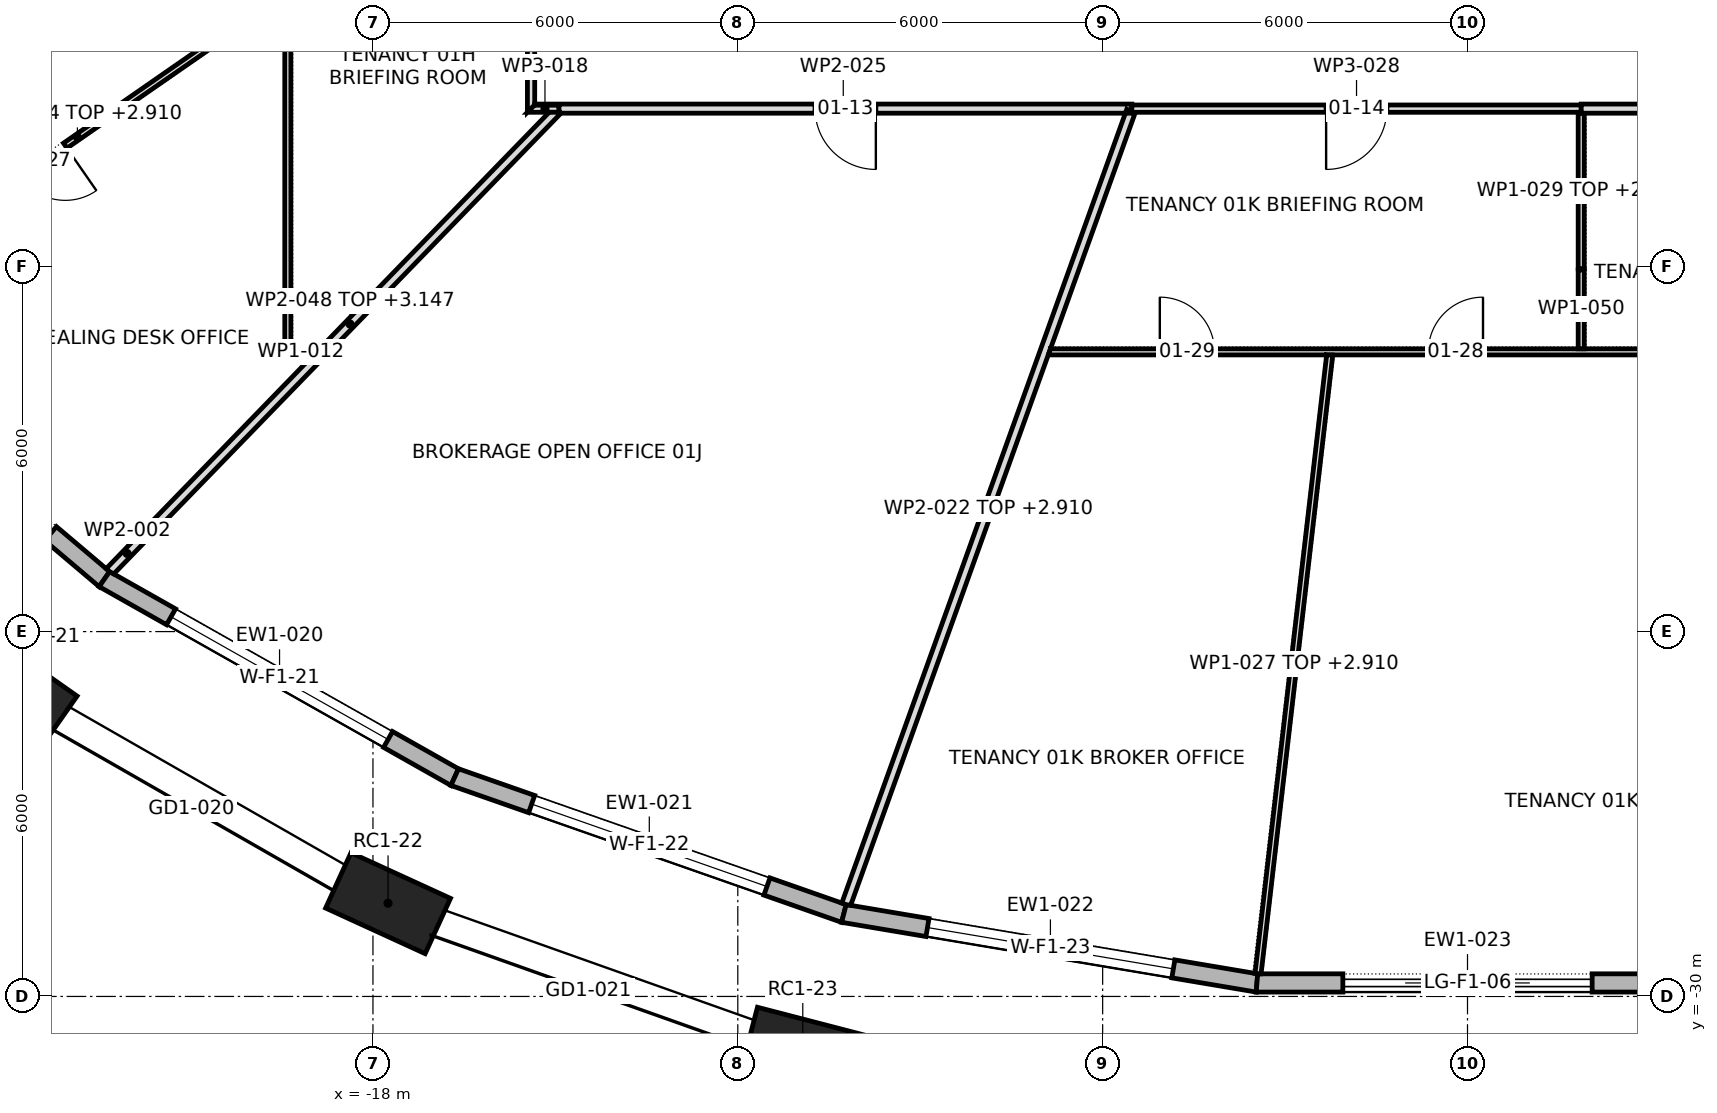
"""IFC4 building model, lengths in metres.
Left out: names, types, materials, properties, quantities, classifications, styles, units other than length and angle.
Written with IfcOpenShell. Run it as: python <this file> out.ifc"""

import sys

from ifc_helpers import new_model, si_unit, direction, frame, frame_2d, origin, origin_2d, place, context, subcontext, project, spatial, polyline, rectangle, outline, extrude, element, fill, save


model = new_model("IFC4")
c1 = context("Model", 3, precision=1e-05, world=origin(), true_north=direction((0.0, 1.0)))
c2 = subcontext(c1, "Body", "Model", "MODEL_VIEW")
j1 = project(units=[si_unit("LENGTHUNIT", "METRE"), si_unit("PLANEANGLEUNIT", "RADIAN")], contexts=[c1])
p1 = place(None, origin())
s1 = spatial("IfcSite", under=j1, at=p1, CompositionType="ELEMENT")
p2 = place(p1, origin())
s2 = spatial("IfcBuilding", under=s1, at=p2, CompositionType="ELEMENT")
p3 = place(p2, frame((0.0, 0.0, 31.9)))
s3 = spatial("IfcBuildingStorey", under=s2, at=p3, CompositionType="ELEMENT", Elevation=31.9)
for number, where, z_axis, x_axis in (
    (1, (-23.89, -24.951, 0.0), (0.0, 0.0, 1.0), (0.818, -0.575, 0.0)),
    (2, (-17.752, -28.467, 0.0), (0.0, 0.0, 1.0), (0.909, -0.417, 0.0)),
    (3, (-10.931, -30.888, 0.0), (0.0, 0.0, 1.0), (0.968, -0.252, 0.0)),
):
    element("IfcColumn", number, at=place(p3, frame(where, z_axis=z_axis, x_axis=x_axis)), inside=s3, PredefinedType="COLUMN", context=c2, shape_type="SweptSolid", body=[
        extrude(rectangle(XDim=1.8, YDim=1.0, at=origin_2d()), origin(), (0.0, 0.0, 1.0), 4.2),
    ])
p4 = place(p3, frame((-27.318, -18.992, 0.0), z_axis=(0.0, 0.0, 1.0), x_axis=(0.763540615407, -0.645759807223, 0.0)))
e4 = element("IfcWall", 4, at=p4, inside=s3, PredefinedType="STANDARD", context=c2, shape_type="SweptSolid", body=[
    extrude(outline(polyline([(-0.015, -0.15), (6.434, -0.15), (6.406, 0.15), (0.015, 0.15), (-0.015, -0.15)])), origin(), (0.0, 0.0, 1.0), 3.9),
])
p5 = place(p4, frame((1.16, 0.0, 0.0)))
e5 = element("IfcOpeningElement", 5, at=p5, cuts=e4, PredefinedType="OPENING", context=c2, shape_type="SweptSolid", body=[
    extrude(rectangle(XDim=4.1, YDim=3.45, at=frame_2d((2.05, 1.725))), frame((0.0, 0.162, 0.0), z_axis=(0.0, -1.0, 0.0), x_axis=(1.0, 0.0, 0.0)), (0.0, 0.0, 1.0), 0.324),
])
p6 = place(p3, frame((-22.417, -23.137, 0.0), z_axis=(0.0, 0.0, 1.0), x_axis=(0.8705786416, -0.492029296678, 0.0)))
e6 = element("IfcWall", 6, at=p6, inside=s3, PredefinedType="STANDARD", context=c2, shape_type="SweptSolid", body=[
    extrude(outline(polyline([(-0.014, -0.15), (6.631, -0.15), (6.604, 0.15), (0.014, 0.15), (-0.014, -0.15)])), origin(), (0.0, 0.0, 1.0), 3.9),
])
p7 = place(p6, frame((1.259, 0.0, 0.6)))
e7 = element("IfcOpeningElement", 7, at=p7, cuts=e6, PredefinedType="OPENING", context=c2, shape_type="SweptSolid", body=[
    extrude(rectangle(XDim=4.1, YDim=2.85, at=frame_2d((2.05, 1.425))), frame((0.0, 0.162, 0.0), z_axis=(0.0, -1.0, 0.0), x_axis=(1.0, 0.0, 0.0)), (0.0, 0.0, 1.0), 0.324),
])
p8 = place(p3, frame((-16.656, -26.393, 0.0), z_axis=(0.0, 0.0, 1.0), x_axis=(0.943767392455, -0.330610206947, 0.0)))
e8 = element("IfcWall", 8, at=p8, inside=s3, PredefinedType="STANDARD", context=c2, shape_type="SweptSolid", body=[
    extrude(outline(polyline([(-0.013, -0.15), (6.794, -0.15), (6.769, 0.15), (0.013, 0.15), (-0.013, -0.15)])), origin(), (0.0, 0.0, 1.0), 3.9),
])
p9 = place(p8, frame((1.341, 0.0, 0.6)))
e9 = element("IfcOpeningElement", 9, at=p9, cuts=e8, PredefinedType="OPENING", context=c2, shape_type="SweptSolid", body=[
    extrude(rectangle(XDim=4.1, YDim=2.85, at=frame_2d((2.05, 1.425))), frame((0.0, 0.162, 0.0), z_axis=(0.0, -1.0, 0.0), x_axis=(1.0, 0.0, 0.0)), (0.0, 0.0, 1.0), 0.324),
])
p10 = place(p3, frame((-10.256, -28.635, 0.0), z_axis=(0.0, 0.0, 1.0), x_axis=(0.986141805867, -0.165904607291, 0.0)))
e10 = element("IfcWall", 10, at=p10, inside=s3, PredefinedType="STANDARD", context=c2, shape_type="SweptSolid", body=[
    extrude(outline(polyline([(-0.013, -0.15), (6.901, -0.15), (6.876, 0.15), (0.013, 0.15), (-0.013, -0.15)])), origin(), (0.0, 0.0, 1.0), 3.9),
])
p11 = place(p10, frame((1.394, 0.0, 0.6)))
e11 = element("IfcOpeningElement", 11, at=p11, cuts=e10, PredefinedType="OPENING", context=c2, shape_type="SweptSolid", body=[
    extrude(rectangle(XDim=4.1, YDim=2.85, at=frame_2d((2.05, 1.425))), frame((0.0, 0.162, 0.0), z_axis=(0.0, -1.0, 0.0), x_axis=(1.0, 0.0, 0.0)), (0.0, 0.0, 1.0), 0.324),
])
p12 = place(p3, frame((-3.463, -29.778, 0.0), z_axis=(0.0, 0.0, 1.0), x_axis=(1.0, 0.0, 0.0)))
e12 = element("IfcWall", 12, at=p12, inside=s3, PredefinedType="STANDARD", context=c2, shape_type="SweptSolid", body=[
    extrude(outline(polyline([(-0.012, -0.15), (6.938, -0.15), (6.913, 0.15), (0.012, 0.15), (-0.012, -0.15)])), origin(), (0.0, 0.0, 1.0), 3.9),
])
p13 = place(p12, frame((1.413, 0.0, 0.0)))
e13 = element("IfcOpeningElement", 13, at=p13, cuts=e12, PredefinedType="OPENING", context=c2, shape_type="SweptSolid", body=[
    extrude(rectangle(XDim=4.1, YDim=3.45, at=frame_2d((2.05, 1.725))), frame((0.0, 0.162, 0.0), z_axis=(0.0, -1.0, 0.0), x_axis=(1.0, 0.0, 0.0)), (0.0, 0.0, 1.0), 0.324),
])
p14 = place(p3, frame((-22.333, -23.018, 0.0), z_axis=(0.0, 0.0, 1.0), x_axis=(0.696297301531, 0.717753486846, 0.0)))
e14 = element("IfcWall", 14, at=p14, inside=s3, PredefinedType="PARTITIONING", context=c2, shape_type="SweptSolid", body=[
    extrude(outline(polyline([(0.0, 0.075), (0.0, 0.072), (0.005, 0.001), (0.025, -0.075), (0.831, -0.075), (0.831, 0.075), (0.0, 0.075)])), origin(), (0.0, 0.0, 1.0), 3.9),
])
p15 = place(p3, frame((-19.4, -19.45, 0.0), z_axis=(0.0, 0.0, 1.0), x_axis=(0.0, 1.0, 0.0)))
e15 = element("IfcWall", 15, at=p15, inside=s3, PredefinedType="PARTITIONING", context=c2, shape_type="SweptSolid", body=[
    extrude(outline(polyline([(0.1, -0.05), (1.802, -0.05), (3.503, -0.05), (5.205, -0.05), (6.907, -0.05), (8.608, -0.05), (10.31, -0.05), (10.31, -0.05), (10.41, -0.05), (10.41, -0.05), (12.25, -0.05), (14.089, -0.05), (15.929, -0.05), (17.769, -0.05), (17.769, -0.047), (17.761, 0.044), (17.769, 0.044), (17.769, 0.045), (17.751, 0.044), (17.75, 0.05), (16.082, 0.05), (14.413, 0.05), (14.406, 0.048), (14.406, 0.05), (12.702, 0.05), (10.999, 0.05), (9.296, 0.05), (7.593, 0.05), (5.89, 0.05), (5.886, 0.048), (5.885, 0.05), (3.923, 0.05), (1.961, 0.05), (0.0, 0.05), (0.1, -0.05), (0.1, -0.05)])), origin(), (0.0, 0.0, 1.0), 3.9),
])
p16 = place(p15, frame((11.965, 0.0, 0.0)))
e16 = element("IfcOpeningElement", 16, at=p16, cuts=e15, PredefinedType="OPENING", context=c2, shape_type="SweptSolid", body=[
    extrude(rectangle(XDim=0.9, YDim=2.1, at=frame_2d((0.45, 1.05))), frame((0.0, 0.062, 0.0), z_axis=(0.0, -1.0, 0.0), x_axis=(1.0, 0.0, 0.0)), (0.0, 0.0, 1.0), 0.124),
])
p17 = place(p3, frame((-19.422, -13.485, 0.0), z_axis=(0.0, 0.0, 1.0), x_axis=(-0.821712123272, -0.569902786858, 0.0)))
e17 = element("IfcWall", 17, at=p17, inside=s3, PredefinedType="PARTITIONING", context=c2, shape_type="SweptSolid", body=[
    extrude(outline(polyline([(8.335, 0.05), (6.682, 0.05), (5.029, 0.05), (3.375, 0.05), (1.722, 0.05), (0.069, 0.05), (0.0, -0.049), (0.0, -0.05), (1.667, -0.05), (3.334, -0.05), (5.001, -0.05), (6.668, -0.05), (8.335, -0.05), (8.335, 0.05)])), origin(), (0.0, 0.0, 1.0), 2.91),
])
p18 = place(p17, frame((4.428, 0.0, 0.0)))
e18 = element("IfcOpeningElement", 18, at=p18, cuts=e17, PredefinedType="OPENING", context=c2, shape_type="SweptSolid", body=[
    extrude(rectangle(XDim=0.9, YDim=2.1, at=frame_2d((0.45, 1.05))), frame((0.0, 0.062, 0.0), z_axis=(0.0, -1.0, 0.0), x_axis=(1.0, 0.0, 0.0)), (0.0, 0.0, 1.0), 0.124),
])
p19 = place(p3, frame((-18.972, -19.4, 0.0), z_axis=(0.0, 0.0, 1.0), x_axis=(-1.0, 0.0, 0.0)))
e19 = element("IfcWall", 19, at=p19, inside=s3, PredefinedType="PARTITIONING", context=c2, shape_type="SweptSolid", body=[
    extrude(outline(polyline([(0.0, -0.05), (0.377, -0.05), (0.478, 0.05), (0.0, 0.05), (0.0, -0.05)])), origin(), (0.0, 0.0, 1.0), 3.9),
])
p20 = place(p3, frame((-15.4, -15.46, 0.0), z_axis=(0.0, 0.0, 1.0), x_axis=(0.0, 1.0, 0.0)))
e20 = element("IfcWall", 20, at=p20, inside=s3, PredefinedType="PARTITIONING", context=c2, shape_type="SweptSolid", body=[
    extrude(outline(polyline([(6.37, 0.06), (4.777, 0.06), (3.185, 0.06), (1.593, 0.06), (0.0, 0.06), (0.12, -0.06), (1.683, -0.06), (3.245, -0.06), (4.807, -0.06), (6.37, -0.06), (6.37, 0.06)])), origin(), (0.0, 0.0, 1.0), 3.9),
])
p21 = place(p20, frame((2.715, 0.0, 0.0)))
e21 = element("IfcOpeningElement", 21, at=p21, cuts=e20, PredefinedType="OPENING", context=c2, shape_type="SweptSolid", body=[
    extrude(rectangle(XDim=1.0, YDim=2.1, at=frame_2d((0.5, 1.05))), frame((0.0, 0.072, 0.0), z_axis=(0.0, -1.0, 0.0), x_axis=(1.0, 0.0, 0.0)), (0.0, 0.0, 1.0), 0.144),
])
p22 = place(p3, frame((-14.94, -15.4, 0.0), z_axis=(0.0, 0.0, 1.0), x_axis=(-1.0, 0.0, 0.0)))
e22 = element("IfcWall", 22, at=p22, inside=s3, PredefinedType="PARTITIONING", context=c2, shape_type="SweptSolid", body=[
    extrude(outline(polyline([(0.0, -0.06), (0.4, -0.06), (0.52, 0.06), (0.0, 0.06), (0.0, -0.06)])), origin(), (0.0, 0.0, 1.0), 3.9),
])
p23 = place(p3, frame((-10.219, -28.49, 0.0), z_axis=(0.0, 0.0, 1.0), x_axis=(0.337910330096, 0.941178308725, 0.0)))
e23 = element("IfcWall", 23, at=p23, inside=s3, PredefinedType="PARTITIONING", context=c2, shape_type="SweptSolid", body=[
    extrude(outline(polyline([(0.014, -0.075), (1.958, -0.075), (3.902, -0.075), (5.845, -0.075), (7.789, -0.075), (9.733, -0.075), (9.737, -0.073), (9.738, -0.075), (11.115, -0.075), (12.493, -0.075), (13.871, -0.075), (13.871, -0.075), (13.853, -0.024), (13.853, -0.024), (13.851, -0.02), (13.837, -0.025), (13.801, 0.075), (11.829, 0.075), (9.858, 0.075), (7.886, 0.075), (5.915, 0.075), (3.943, 0.075), (1.972, 0.075), (0.0, 0.075), (0.0, 0.066), (0.0, -0.001), (0.014, -0.075)])), origin(), (0.0, 0.0, 1.0), 2.91),
])
p24 = place(p3, frame((-6.894, -19.4, 0.0), z_axis=(0.0, 0.0, 1.0), x_axis=(1.0, 0.0, 0.0)))
e24 = element("IfcWall", 24, at=p24, inside=s3, PredefinedType="PARTITIONING", context=c2, shape_type="SweptSolid", body=[
    extrude(outline(polyline([(0.0, -0.05), (1.526, -0.05), (3.052, -0.05), (4.578, -0.05), (4.578, -0.049), (4.587, -0.05), (6.454, -0.05), (8.321, -0.05), (10.188, -0.05), (12.055, -0.05), (13.922, -0.05), (13.925, -0.049), (13.925, -0.05), (15.696, -0.05), (17.468, -0.05), (19.239, -0.05), (19.243, -0.047), (19.245, -0.05), (20.848, -0.05), (22.451, -0.05), (24.054, -0.05), (25.657, -0.05), (25.657, -0.05), (25.614, -0.005), (25.614, -0.005), (25.561, 0.05), (23.819, 0.05), (22.076, 0.05), (20.334, 0.05), (18.591, 0.05), (16.849, 0.05), (15.106, 0.05), (13.364, 0.05), (13.364, 0.05), (13.264, 0.05), (13.264, 0.05), (11.781, 0.05), (10.297, 0.05), (8.814, 0.05), (8.814, 0.05), (8.714, 0.05), (8.714, 0.05), (6.978, 0.05), (5.243, 0.05), (3.507, 0.05), (1.771, 0.05), (0.036, 0.05), (0.0, -0.049), (0.0, -0.05)])), origin(), (0.0, 0.0, 1.0), 3.9),
])
p25 = place(p24, frame((6.249, 0.0, 0.0)))
e25 = element("IfcOpeningElement", 25, at=p25, cuts=e24, PredefinedType="OPENING", context=c2, shape_type="SweptSolid", body=[
    extrude(rectangle(XDim=0.9, YDim=2.1, at=frame_2d((0.45, 1.05))), frame((0.0, 0.062, 0.0), z_axis=(0.0, -1.0, 0.0), x_axis=(1.0, 0.0, 0.0)), (0.0, 0.0, 1.0), 0.124),
])
p26 = place(p24, frame((1.834, 0.0, 0.0)))
e26 = element("IfcOpeningElement", 26, at=p26, cuts=e24, PredefinedType="OPENING", context=c2, shape_type="SweptSolid", body=[
    extrude(rectangle(XDim=0.9, YDim=2.1, at=frame_2d((0.45, 1.05))), frame((0.0, 0.062, 0.0), z_axis=(0.0, -1.0, 0.0), x_axis=(1.0, 0.0, 0.0)), (0.0, 0.0, 1.0), 0.124),
])
p27 = place(p3, frame((-5.52, -15.4, 0.0), z_axis=(0.0, 0.0, 1.0), x_axis=(-1.0, 0.0, 0.0)))
e27 = element("IfcWall", 27, at=p27, inside=s3, PredefinedType="PARTITIONING", context=c2, shape_type="SweptSolid", body=[
    extrude(outline(polyline([(0.0, -0.075), (1.964, -0.075), (3.928, -0.075), (5.892, -0.075), (7.856, -0.075), (9.82, -0.075), (9.82, -0.06), (9.42, -0.06), (9.42, 0.045), (9.389, 0.075), (7.532, 0.075), (5.676, 0.075), (3.82, 0.075), (1.963, 0.075), (0.106, 0.075), (0.083, 0.01), (0.0, 0.039), (0.0, -0.075)])), origin(), (0.0, 0.0, 1.0), 3.9),
])
p28 = place(p27, frame((4.21, 0.0, 0.0)))
e28 = element("IfcOpeningElement", 28, at=p28, cuts=e27, PredefinedType="OPENING", context=c2, shape_type="SweptSolid", body=[
    extrude(rectangle(XDim=1.0, YDim=2.1, at=frame_2d((0.5, 1.05))), frame((0.0, 0.087, 0.0), z_axis=(0.0, -1.0, 0.0), x_axis=(1.0, 0.0, 0.0)), (0.0, 0.0, 1.0), 0.174),
])
p29 = place(p3, frame((-3.445, -29.626, 0.0), z_axis=(0.0, 0.0, 1.0), x_axis=(0.115096942751, 0.993354263981, 0.0)))
e29 = element("IfcWall", 29, at=p29, inside=s3, PredefinedType="PARTITIONING", context=c2, shape_type="SweptSolid", body=[
    extrude(outline(polyline([(10.25, -0.05), (10.25, -0.047), (10.238, 0.05), (8.532, 0.05), (6.825, 0.05), (5.119, 0.05), (3.413, 0.05), (1.706, 0.05), (0.0, 0.05), (0.0, -0.018), (0.004, -0.05), (1.711, -0.05), (3.419, -0.05), (5.127, -0.05), (6.834, -0.05), (8.542, -0.05), (10.25, -0.05)])), origin(), (0.0, 0.0, 1.0), 2.91),
])
p30 = place(p3, frame((1.87, -15.4, 0.0), z_axis=(0.0, 0.0, 1.0), x_axis=(-1.0, 0.0, 0.0)))
e30 = element("IfcWall", 30, at=p30, inside=s3, PredefinedType="PARTITIONING", context=c2, shape_type="SweptSolid", body=[
    extrude(rectangle(XDim=7.39, YDim=0.12, at=frame_2d((3.695, 0.0))), origin(), (0.0, 0.0, 1.0), 3.9),
])
p31 = place(p30, frame((3.195, 0.0, 0.0)))
e31 = element("IfcOpeningElement", 31, at=p31, cuts=e30, PredefinedType="OPENING", context=c2, shape_type="SweptSolid", body=[
    extrude(rectangle(XDim=1.0, YDim=2.1, at=frame_2d((0.5, 1.05))), frame((0.0, 0.072, 0.0), z_axis=(0.0, -1.0, 0.0), x_axis=(1.0, 0.0, 0.0)), (0.0, 0.0, 1.0), 0.144),
])
p32 = place(p3, frame((1.87, -15.46, 0.0), z_axis=(0.0, 0.0, 1.0), x_axis=(0.0, -1.0, 0.0)))
e32 = element("IfcWall", 32, at=p32, inside=s3, PredefinedType="PARTITIONING", context=c2, shape_type="SweptSolid", body=[
    extrude(outline(polyline([(2.583, 0.05), (1.299, 0.05), (0.015, 0.05), (0.015, 0.0), (0.0, 0.0), (0.0, -0.05), (1.292, -0.05), (2.583, -0.05), (2.583, 0.05)])), origin(), (0.0, 0.0, 1.0), 2.91),
])
p33 = place(p3, frame((1.87, -15.4, 0.0), z_axis=(0.0, 0.0, 1.0), x_axis=(1.0, 0.0, 0.0)))
e33 = element("IfcWall", 33, at=p33, inside=s3, PredefinedType="PARTITIONING", context=c2, shape_type="SweptSolid", body=[
    extrude(outline(polyline([(0.0, -0.075), (1.944, -0.075), (3.887, -0.075), (5.831, -0.075), (7.774, -0.075), (9.718, -0.075), (11.661, -0.075), (13.605, -0.075), (13.455, 0.075), (11.533, 0.075), (9.611, 0.075), (7.688, 0.075), (5.766, 0.075), (3.844, 0.075), (1.922, 0.075), (0.0, 0.075), (0.0, -0.075)])), origin(), (0.0, 0.0, 1.0), 3.9),
])
p34 = place(p33, frame((1.775, 0.0, 0.0)))
e34 = element("IfcOpeningElement", 34, at=p34, cuts=e33, PredefinedType="OPENING", context=c2, shape_type="SweptSolid", body=[
    extrude(rectangle(XDim=1.0, YDim=2.1, at=frame_2d((0.5, 1.05))), frame((0.0, 0.087, 0.0), z_axis=(0.0, -1.0, 0.0), x_axis=(1.0, 0.0, 0.0)), (0.0, 0.0, 1.0), 0.174),
])
p35 = place(p33, frame((8.31, 0.0, 0.0)))
e35 = element("IfcOpeningElement", 35, at=p35, cuts=e33, PredefinedType="OPENING", context=c2, shape_type="SweptSolid", body=[
    extrude(rectangle(XDim=1.0, YDim=2.1, at=frame_2d((0.5, 1.05))), frame((0.0, 0.087, 0.0), z_axis=(0.0, -1.0, 0.0), x_axis=(1.0, 0.0, 0.0)), (0.0, 0.0, 1.0), 0.174),
])
p36 = place(p3, frame((-21.755, -22.421, 0.0), z_axis=(0.0, 0.0, 1.0), x_axis=(0.69648940436, 0.717567076735, 0.0)))
e36 = element("IfcWall", 36, at=p36, inside=s3, PredefinedType="PARTITIONING", context=c2, shape_type="SweptSolid", body=[
    extrude(outline(polyline([(9.753, -0.075), (9.753, -0.074), (9.731, -0.052), (9.742, -0.042), (9.682, 0.02), (9.682, 0.02), (9.629, 0.075), (7.777, 0.075), (5.925, 0.075), (4.073, 0.075), (4.07, 0.073), (4.068, 0.075), (2.712, 0.075), (1.356, 0.075), (0.0, 0.075), (0.0, -0.075), (1.95, -0.075), (3.901, -0.075), (5.852, -0.075), (7.802, -0.075), (9.753, -0.075)])), origin(), (0.0, 0.0, 1.0), 3.147),
])
p37 = place(p3, frame((1.87, -18.043, 0.0), z_axis=(0.0, 0.0, 1.0), x_axis=(0.0, -1.0, 0.0)))
e37 = element("IfcWall", 37, at=p37, inside=s3, PredefinedType="PARTITIONING", context=c2, shape_type="SweptSolid", body=[
    extrude(outline(polyline([(0.0, -0.05), (1.307, -0.05), (1.307, 0.05), (0.0, 0.05), (0.0, -0.05)])), origin(), (0.0, 0.0, 1.0), 3.9),
])
p38 = place(p7, origin())
e38 = element("IfcWindow", 38, at=p38, inside=s3, PartitioningType="TRIPLE_PANEL_VERTICAL", PredefinedType="WINDOW", context=c2, shape_type="SweptSolid", body=[
    extrude(rectangle(XDim=4.1, YDim=2.85, at=frame_2d((2.05, 1.425))), frame((0.0, 0.03, 0.0), z_axis=(0.0, -1.0, 0.0), x_axis=(1.0, 0.0, 0.0)), (0.0, 0.0, 1.0), 0.06),
])
fill(e7, e38)
p39 = place(p9, origin())
e39 = element("IfcWindow", 39, at=p39, inside=s3, PartitioningType="TRIPLE_PANEL_VERTICAL", PredefinedType="WINDOW", context=c2, shape_type="SweptSolid", body=[
    extrude(rectangle(XDim=4.1, YDim=2.85, at=frame_2d((2.05, 1.425))), frame((0.0, 0.03, 0.0), z_axis=(0.0, -1.0, 0.0), x_axis=(1.0, 0.0, 0.0)), (0.0, 0.0, 1.0), 0.06),
])
fill(e9, e39)
p40 = place(p11, origin())
e40 = element("IfcWindow", 40, at=p40, inside=s3, PartitioningType="TRIPLE_PANEL_VERTICAL", PredefinedType="WINDOW", context=c2, shape_type="SweptSolid", body=[
    extrude(rectangle(XDim=4.1, YDim=2.85, at=frame_2d((2.05, 1.425))), frame((0.0, 0.03, 0.0), z_axis=(0.0, -1.0, 0.0), x_axis=(1.0, 0.0, 0.0)), (0.0, 0.0, 1.0), 0.06),
])
fill(e11, e40)
p41 = place(p13, origin())
e41 = element("IfcDoor", 41, at=p41, inside=s3, OperationType="DOUBLE_DOOR_SLIDING", PredefinedType="DOOR", context=c2, shape_type="SweptSolid", body=[
    extrude(rectangle(XDim=4.1, YDim=3.45, at=frame_2d((2.05, 1.725))), frame((0.0, 0.025, 0.0), z_axis=(0.0, -1.0, 0.0), x_axis=(1.0, 0.0, 0.0)), (0.0, 0.0, 1.0), 0.05),
])
fill(e13, e41)
p42 = place(p28, origin())
e42 = element("IfcDoor", 42, at=p42, inside=s3, OperationType="SINGLE_SWING_RIGHT", PredefinedType="DOOR", context=c2, shape_type="SweptSolid", body=[
    extrude(rectangle(XDim=1.0, YDim=2.1, at=frame_2d((0.5, 1.05))), frame((0.0, 0.025, 0.0), z_axis=(0.0, -1.0, 0.0), x_axis=(1.0, 0.0, 0.0)), (0.0, 0.0, 1.0), 0.05),
])
fill(e28, e42)
p43 = place(p31, origin())
e43 = element("IfcDoor", 43, at=p43, inside=s3, OperationType="SINGLE_SWING_LEFT", PredefinedType="DOOR", context=c2, shape_type="SweptSolid", body=[
    extrude(rectangle(XDim=1.0, YDim=2.1, at=frame_2d((0.5, 1.05))), frame((0.0, 0.025, 0.0), z_axis=(0.0, -1.0, 0.0), x_axis=(1.0, 0.0, 0.0)), (0.0, 0.0, 1.0), 0.05),
])
fill(e31, e43)
p44 = place(p18, origin())
e44 = element("IfcDoor", 44, at=p44, inside=s3, OperationType="SINGLE_SWING_RIGHT", PredefinedType="DOOR", context=c2, shape_type="SweptSolid", body=[
    extrude(rectangle(XDim=0.9, YDim=2.1, at=frame_2d((0.45, 1.05))), frame((0.0, 0.025, 0.0), z_axis=(0.0, -1.0, 0.0), x_axis=(1.0, 0.0, 0.0)), (0.0, 0.0, 1.0), 0.05),
])
fill(e18, e44)
p45 = place(p25, origin())
e45 = element("IfcDoor", 45, at=p45, inside=s3, OperationType="SINGLE_SWING_LEFT", PredefinedType="DOOR", context=c2, shape_type="SweptSolid", body=[
    extrude(rectangle(XDim=0.9, YDim=2.1, at=frame_2d((0.45, 1.05))), frame((0.0, 0.025, 0.0), z_axis=(0.0, -1.0, 0.0), x_axis=(1.0, 0.0, 0.0)), (0.0, 0.0, 1.0), 0.05),
])
fill(e25, e45)
p46 = place(p26, origin())
e46 = element("IfcDoor", 46, at=p46, inside=s3, OperationType="SINGLE_SWING_RIGHT", PredefinedType="DOOR", context=c2, shape_type="SweptSolid", body=[
    extrude(rectangle(XDim=0.9, YDim=2.1, at=frame_2d((0.45, 1.05))), frame((0.0, 0.025, 0.0), z_axis=(0.0, -1.0, 0.0), x_axis=(1.0, 0.0, 0.0)), (0.0, 0.0, 1.0), 0.05),
])
fill(e26, e46)
save(model, sys.argv[1])
